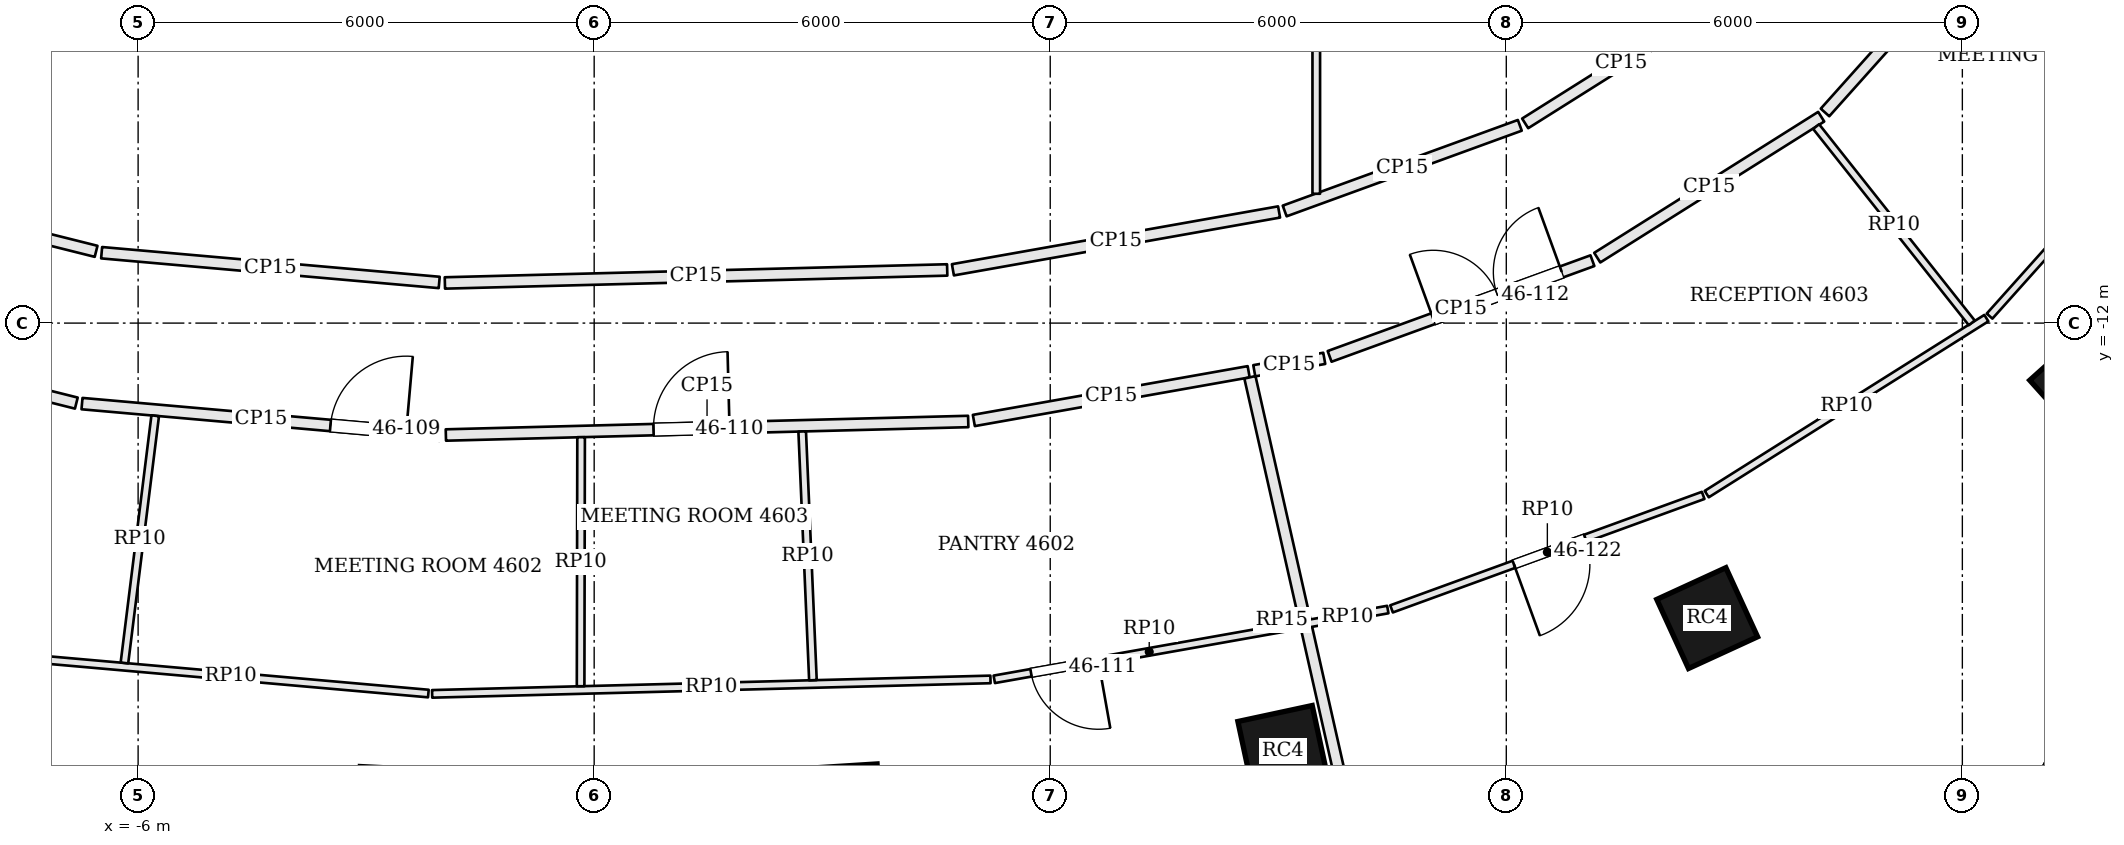
"""IFC4 building model, lengths in metres.
Left out: names, types, materials, properties, quantities, classifications, styles, units other than length and angle.
Written with IfcOpenShell. Run it as: python <this file> out.ifc"""

import sys

from ifc_helpers import new_model, si_unit, direction, frame, frame_2d, origin, origin_2d, place, context, subcontext, project, spatial, rectangle, extrude, element, fill, save


model = new_model("IFC4")
c1 = context("Model", 3, precision=1e-05, world=origin(), true_north=direction((0.0, 1.0)))
c2 = subcontext(c1, "Body", "Model", "MODEL_VIEW")
j1 = project(units=[si_unit("LENGTHUNIT", "METRE"), si_unit("PLANEANGLEUNIT", "RADIAN")], contexts=[c1])
p1 = place(None, origin())
s1 = spatial("IfcSite", under=j1, at=p1, CompositionType="ELEMENT")
p2 = place(p1, origin())
s2 = spatial("IfcBuilding", under=s1, at=p2, CompositionType="ELEMENT")
p3 = place(p2, frame((0.0, 0.0, 189.6)))
s3 = spatial("IfcBuildingStorey", under=s2, at=p3, CompositionType="ELEMENT", Elevation=189.6)
for number, where, z_axis, x_axis in (
    (1, (3.254, -18.33, 0.0), (0.0, 0.0, 1.0), (0.998, 0.063, 0.0)),
    (2, (9.063, -17.625, 0.0), (0.0, 0.0, 1.0), (0.978, 0.21, 0.0)),
    (3, (14.643, -15.881, 0.0), (0.0, 0.0, 1.0), (0.909, 0.417, 0.0)),
    (4, (19.593, -12.79, 0.0), (0.0, 0.0, 1.0), (0.744, 0.668, 0.0)),
):
    element("IfcColumn", number, at=place(p3, frame(where, z_axis=z_axis, x_axis=x_axis)), inside=s3, PredefinedType="COLUMN", context=c2, shape_type="SweptSolid", body=[
        extrude(rectangle(XDim=1.0, YDim=1.0, at=origin_2d()), origin(), (0.0, 0.0, 1.0), 3.9),
    ])
p4 = place(p3, frame((18.767, -18.854, 0.0), z_axis=(0.0, 0.0, 1.0), x_axis=(0.474475888716, 0.880268499395, 0.0)))
e5 = element("IfcWall", 5, at=p4, inside=s3, PredefinedType="SOLIDWALL", context=c2, shape_type="SweptSolid", body=[
    extrude(rectangle(XDim=4.219, YDim=0.45, at=frame_2d((2.11, 0.0))), origin(), (0.0, 0.0, 1.0), 3.7),
])
p5 = place(p4, frame((1.06, 0.0, 0.9)))
e6 = element("IfcOpeningElement", 6, at=p5, cuts=e5, PredefinedType="OPENING", context=c2, shape_type="SweptSolid", body=[
    extrude(rectangle(XDim=2.1, YDim=2.3, at=frame_2d((1.05, 1.15))), frame((0.0, 0.235, 0.0), z_axis=(0.0, -1.0, 0.0), x_axis=(1.0, 0.0, 0.0)), (0.0, 0.0, 1.0), 0.47),
])
p6 = place(p3, frame((18.896, -18.773, 3.9), z_axis=(0.0, 0.0, 1.0), x_axis=(0.474444905835, 0.880285198857, 0.0)))
e7 = element("IfcWall", 7, at=p6, inside=s3, PredefinedType="PARAPET", context=c2, shape_type="SweptSolid", body=[
    extrude(rectangle(XDim=4.05, YDim=0.3, at=frame_2d((2.025, 0.0))), origin(), (0.0, 0.0, 1.0), 1.1),
])
p7 = place(p3, frame((-11.319, -11.923, 0.0), z_axis=(0.0, 0.0, 1.0), x_axis=(0.969990815038, -0.243141561114, 0.0)))
e8 = element("IfcWall", 8, at=p7, inside=s3, PredefinedType="PARTITIONING", context=c2, shape_type="SweptSolid", body=[
    extrude(rectangle(XDim=4.645, YDim=0.15, at=frame_2d((2.323, 0.0))), origin(), (0.0, 0.0, 1.0), 3.084),
])
p8 = place(p7, frame((0.439, 0.0, 0.0)))
e9 = element("IfcOpeningElement", 9, at=p8, cuts=e8, PredefinedType="OPENING", context=c2, shape_type="SweptSolid", body=[
    extrude(rectangle(XDim=1.8, YDim=2.1, at=frame_2d((0.9, 1.05))), frame((0.0, 0.085, 0.0), z_axis=(0.0, -1.0, 0.0), x_axis=(1.0, 0.0, 0.0)), (0.0, 0.0, 1.0), 0.17),
])
p9 = place(p3, frame((-6.738, -13.059, 0.0), z_axis=(0.0, 0.0, 1.0), x_axis=(0.996143527037, -0.087738666181, 0.0)))
e10 = element("IfcWall", 10, at=p9, inside=s3, PredefinedType="PARTITIONING", context=c2, shape_type="SweptSolid", body=[
    extrude(rectangle(XDim=4.73, YDim=0.15, at=frame_2d((2.365, 0.0))), origin(), (0.0, 0.0, 1.0), 3.084),
])
p10 = place(p9, frame((3.281, 0.0, 0.0)))
e11 = element("IfcOpeningElement", 11, at=p10, cuts=e10, PredefinedType="OPENING", context=c2, shape_type="SweptSolid", body=[
    extrude(rectangle(XDim=1.0, YDim=2.4, at=frame_2d((0.5, 1.2))), frame((0.0, 0.085, 0.0), z_axis=(0.0, -1.0, 0.0), x_axis=(1.0, 0.0, 0.0)), (0.0, 0.0, 1.0), 0.17),
])
p11 = place(p3, frame((-1.951, -13.472, 0.0), z_axis=(0.0, 0.0, 1.0), x_axis=(0.999663898238, 0.025924709429, 0.0)))
e12 = element("IfcWall", 12, at=p11, inside=s3, PredefinedType="PARTITIONING", context=c2, shape_type="SweptSolid", body=[
    extrude(rectangle(XDim=6.875, YDim=0.15, at=frame_2d((3.437, 0.0))), origin(), (0.0, 0.0, 1.0), 3.084),
])
p12 = place(p11, frame((2.733, 0.0, 0.0)))
e13 = element("IfcOpeningElement", 13, at=p12, cuts=e12, PredefinedType="OPENING", context=c2, shape_type="SweptSolid", body=[
    extrude(rectangle(XDim=1.0, YDim=2.4, at=frame_2d((0.5, 1.2))), frame((0.0, 0.085, 0.0), z_axis=(0.0, -1.0, 0.0), x_axis=(1.0, 0.0, 0.0)), (0.0, 0.0, 1.0), 0.17),
])
p13 = place(p3, frame((4.995, -13.281, 0.0), z_axis=(0.0, 0.0, 1.0), x_axis=(0.984641336619, 0.174589341658, 0.0)))
e14 = element("IfcWall", 14, at=p13, inside=s3, PredefinedType="PARTITIONING", context=c2, shape_type="SweptSolid", body=[
    extrude(rectangle(XDim=3.672, YDim=0.15, at=frame_2d((1.836, 0.0))), origin(), (0.0, 0.0, 1.0), 3.084),
])
p14 = place(p3, frame((10.068, -19.093, 0.0), z_axis=(0.0, 0.0, 1.0), x_axis=(-0.22036399205, 0.975417711039, 0.0)))
e15 = element("IfcWall", 15, at=p14, inside=s3, PredefinedType="PARTITIONING", context=c2, shape_type="SweptSolid", body=[
    extrude(rectangle(XDim=6.54, YDim=0.15, at=frame_2d((3.27, 0.0))), origin(), (0.0, 0.0, 1.0), 3.184),
])
p15 = place(p3, frame((8.684, -12.627, 0.0), z_axis=(0.0, 0.0, 1.0), x_axis=(0.984625439098, 0.174678976069, 0.0)))
e16 = element("IfcWall", 16, at=p15, inside=s3, PredefinedType="PARTITIONING", context=c2, shape_type="SweptSolid", body=[
    extrude(rectangle(XDim=0.935, YDim=0.15, at=frame_2d((0.468, 0.0))), origin(), (0.0, 0.0, 1.0), 3.084),
])
p16 = place(p3, frame((9.676, -12.438, 0.0), z_axis=(0.0, 0.0, 1.0), x_axis=(0.939640289748, 0.342163887461, 0.0)))
e17 = element("IfcWall", 17, at=p16, inside=s3, PredefinedType="PARTITIONING", context=c2, shape_type="SweptSolid", body=[
    extrude(rectangle(XDim=3.68, YDim=0.15, at=frame_2d((1.84, 0.0))), origin(), (0.0, 0.0, 1.0), 3.084),
])
p17 = place(p16, frame((1.45, 0.0, 0.0)))
e18 = element("IfcOpeningElement", 18, at=p17, cuts=e17, PredefinedType="OPENING", context=c2, shape_type="SweptSolid", body=[
    extrude(rectangle(XDim=1.8, YDim=2.1, at=frame_2d((0.9, 1.05))), frame((0.0, 0.085, 0.0), z_axis=(0.0, -1.0, 0.0), x_axis=(1.0, 0.0, 0.0)), (0.0, 0.0, 1.0), 0.17),
])
p18 = place(p3, frame((13.197, -11.139, 0.0), z_axis=(0.0, 0.0, 1.0), x_axis=(0.846390903833, 0.532562144644, 0.0)))
e19 = element("IfcWall", 19, at=p18, inside=s3, PredefinedType="PARTITIONING", context=c2, shape_type="SweptSolid", body=[
    extrude(rectangle(XDim=3.481, YDim=0.15, at=frame_2d((1.741, 0.0))), origin(), (0.0, 0.0, 1.0), 3.084),
])
p19 = place(p3, frame((16.193, -9.229, 0.0), z_axis=(0.0, 0.0, 1.0), x_axis=(0.666882089048, 0.745163256815, 0.0)))
e20 = element("IfcWall", 20, at=p19, inside=s3, PredefinedType="PARTITIONING", context=c2, shape_type="SweptSolid", body=[
    extrude(rectangle(XDim=3.19, YDim=0.15, at=frame_2d((1.595, 0.0))), origin(), (0.0, 0.0, 1.0), 3.084),
])
p20 = place(p3, frame((14.777, -7.781, 0.0), z_axis=(0.0, 0.0, 1.0), x_axis=(-0.846359741043, -0.532611667862, 0.0)))
e21 = element("IfcWall", 21, at=p20, inside=s3, PredefinedType="PARTITIONING", context=c2, shape_type="SweptSolid", body=[
    extrude(rectangle(XDim=2.987, YDim=0.15, at=frame_2d((1.494, 0.0))), origin(), (0.0, 0.0, 1.0), 3.084),
])
p21 = place(p3, frame((12.178, -9.398, 0.0), z_axis=(0.0, 0.0, 1.0), x_axis=(-0.939609240084, -0.342249143093, 0.0)))
e22 = element("IfcWall", 22, at=p21, inside=s3, PredefinedType="PARTITIONING", context=c2, shape_type="SweptSolid", body=[
    extrude(rectangle(XDim=3.292, YDim=0.15, at=frame_2d((1.646, 0.0))), origin(), (0.0, 0.0, 1.0), 3.084),
])
p22 = place(p3, frame((9.01, -10.538, 0.0), z_axis=(0.0, 0.0, 1.0), x_axis=(-0.984645638575, -0.174565077936, 0.0)))
e23 = element("IfcWall", 23, at=p22, inside=s3, PredefinedType="PARTITIONING", context=c2, shape_type="SweptSolid", body=[
    extrude(rectangle(XDim=4.358, YDim=0.15, at=frame_2d((2.179, 0.0))), origin(), (0.0, 0.0, 1.0), 3.084),
])
p23 = place(p3, frame((4.645, -11.301, 0.0), z_axis=(0.0, 0.0, 1.0), x_axis=(-0.9996648469, -0.02588810291, 0.0)))
e24 = element("IfcWall", 24, at=p23, inside=s3, PredefinedType="PARTITIONING", context=c2, shape_type="SweptSolid", body=[
    extrude(rectangle(XDim=6.611, YDim=0.15, at=frame_2d((3.305, 0.0))), origin(), (0.0, 0.0, 1.0), 3.084),
])
p24 = place(p3, frame((-2.039, -11.465, 0.0), z_axis=(0.0, 0.0, 1.0), x_axis=(-0.996139855484, 0.087780341286, 0.0)))
e25 = element("IfcWall", 25, at=p24, inside=s3, PredefinedType="PARTITIONING", context=c2, shape_type="SweptSolid", body=[
    extrude(rectangle(XDim=4.458, YDim=0.15, at=frame_2d((2.229, 0.0))), origin(), (0.0, 0.0, 1.0), 3.084),
])
p25 = place(p3, frame((-6.553, -11.056, 0.0), z_axis=(0.0, 0.0, 1.0), x_axis=(-0.970004917182, 0.243085294995, 0.0)))
e26 = element("IfcWall", 26, at=p25, inside=s3, PredefinedType="PARTITIONING", context=c2, shape_type="SweptSolid", body=[
    extrude(rectangle(XDim=4.284, YDim=0.15, at=frame_2d((2.142, 0.0))), origin(), (0.0, 0.0, 1.0), 3.084),
])
p26 = place(p3, frame((9.341, -15.964, 0.0), z_axis=(0.0, 0.0, 1.0), x_axis=(-0.984642561651, -0.174582432638, 0.0)))
e27 = element("IfcWall", 27, at=p26, inside=s3, PredefinedType="PARTITIONING", context=c2, shape_type="SweptSolid", body=[
    extrude(rectangle(XDim=4.141, YDim=0.1, at=frame_2d((2.07, 0.0))), origin(), (0.0, 0.0, 1.0), 3.084),
])
p27 = place(p26, frame((2.75, 0.0, 0.0)))
e28 = element("IfcOpeningElement", 28, at=p27, cuts=e27, PredefinedType="OPENING", context=c2, shape_type="SweptSolid", body=[
    extrude(rectangle(XDim=0.9, YDim=2.1, at=frame_2d((0.45, 1.05))), frame((0.0, 0.06, 0.0), z_axis=(0.0, -1.0, 0.0), x_axis=(1.0, 0.0, 0.0)), (0.0, 0.0, 1.0), 0.12),
])
p28 = place(p3, frame((5.214, -16.688, 0.0), z_axis=(0.0, 0.0, 1.0), x_axis=(-0.999664981446, -0.025882906921, 0.0)))
e29 = element("IfcWall", 29, at=p28, inside=s3, PredefinedType="PARTITIONING", context=c2, shape_type="SweptSolid", body=[
    extrude(rectangle(XDim=7.348, YDim=0.1, at=frame_2d((3.674, 0.0))), origin(), (0.0, 0.0, 1.0), 3.084),
])
p29 = place(p3, frame((-2.181, -16.874, 0.0), z_axis=(0.0, 0.0, 1.0), x_axis=(-0.996143934904, 0.087734035321, 0.0)))
e30 = element("IfcWall", 30, at=p29, inside=s3, PredefinedType="PARTITIONING", context=c2, shape_type="SweptSolid", body=[
    extrude(rectangle(XDim=5.218, YDim=0.1, at=frame_2d((2.609, 0.0))), origin(), (0.0, 0.0, 1.0), 3.084),
])
p30 = place(p3, frame((-5.775, -13.219, 0.0), z_axis=(0.0, 0.0, 1.0), x_axis=(-0.123512108853, -0.992343065158, 0.0)))
e31 = element("IfcWall", 31, at=p30, inside=s3, PredefinedType="PARTITIONING", context=c2, shape_type="SweptSolid", body=[
    extrude(rectangle(XDim=3.277, YDim=0.1, at=frame_2d((1.639, 0.0))), origin(), (0.0, 0.0, 1.0), 3.084),
])
p31 = place(p3, frame((-0.172, -13.501, 0.0), z_axis=(0.0, 0.0, 1.0), x_axis=(-0.001937403219, -0.999998123233, 0.0)))
e32 = element("IfcWall", 32, at=p31, inside=s3, PredefinedType="PARTITIONING", context=c2, shape_type="SweptSolid", body=[
    extrude(rectangle(XDim=3.276, YDim=0.1, at=frame_2d((1.638, 0.0))), origin(), (0.0, 0.0, 1.0), 3.084),
])
p32 = place(p3, frame((2.737, -13.426, 0.0), z_axis=(0.0, 0.0, 1.0), x_axis=(0.043081420795, -0.999071564595, 0.0)))
e33 = element("IfcWall", 33, at=p32, inside=s3, PredefinedType="PARTITIONING", context=c2, shape_type="SweptSolid", body=[
    extrude(rectangle(XDim=3.275, YDim=0.1, at=frame_2d((1.638, 0.0))), origin(), (0.0, 0.0, 1.0), 3.084),
])
p33 = place(p3, frame((21.149, -8.789, 0.0), z_axis=(0.0, 0.0, 1.0), x_axis=(-0.666915902537, -0.745132994132, 0.0)))
e34 = element("IfcWall", 34, at=p33, inside=s3, PredefinedType="PARTITIONING", context=c2, shape_type="SweptSolid", body=[
    extrude(rectangle(XDim=4.186, YDim=0.1, at=frame_2d((2.093, 0.0))), origin(), (0.0, 0.0, 1.0), 3.084),
])
p34 = place(p3, frame((18.316, -11.935, 0.0), z_axis=(0.0, 0.0, 1.0), x_axis=(-0.84637539713, -0.532586788358, 0.0)))
e35 = element("IfcWall", 35, at=p34, inside=s3, PredefinedType="PARTITIONING", context=c2, shape_type="SweptSolid", body=[
    extrude(rectangle(XDim=4.346, YDim=0.1, at=frame_2d((2.173, 0.0))), origin(), (0.0, 0.0, 1.0), 3.084),
])
p35 = place(p3, frame((14.59, -14.267, 0.0), z_axis=(0.0, 0.0, 1.0), x_axis=(-0.939623405418, -0.342210251148, 0.0)))
e36 = element("IfcWall", 36, at=p35, inside=s3, PredefinedType="PARTITIONING", context=c2, shape_type="SweptSolid", body=[
    extrude(rectangle(XDim=4.363, YDim=0.1, at=frame_2d((2.182, 0.0))), origin(), (0.0, 0.0, 1.0), 3.084),
])
p36 = place(p35, frame((1.65, 0.0, 0.0)))
e37 = element("IfcOpeningElement", 37, at=p36, cuts=e36, PredefinedType="OPENING", context=c2, shape_type="SweptSolid", body=[
    extrude(rectangle(XDim=1.0, YDim=2.1, at=frame_2d((0.5, 1.05))), frame((0.0, 0.06, 0.0), z_axis=(0.0, -1.0, 0.0), x_axis=(1.0, 0.0, 0.0)), (0.0, 0.0, 1.0), 0.12),
])
p37 = place(p3, frame((10.441, -15.769, 0.0), z_axis=(0.0, 0.0, 1.0), x_axis=(-0.984657825384, -0.174496323486, 0.0)))
e38 = element("IfcWall", 38, at=p37, inside=s3, PredefinedType="PARTITIONING", context=c2, shape_type="SweptSolid", body=[
    extrude(rectangle(XDim=1.077, YDim=0.1, at=frame_2d((0.539, 0.0))), origin(), (0.0, 0.0, 1.0), 3.084),
])
p38 = place(p3, frame((16.076, -9.415, 0.0), z_axis=(0.0, 0.0, 1.0), x_axis=(0.621346089483, -0.783536238526, 0.0)))
e39 = element("IfcWall", 39, at=p38, inside=s3, PredefinedType="PARTITIONING", context=c2, shape_type="SweptSolid", body=[
    extrude(rectangle(XDim=3.295, YDim=0.1, at=frame_2d((1.647, 0.0))), origin(), (0.0, 0.0, 1.0), 3.084),
])
p39 = place(p3, frame((9.5, -10.299, 0.0), z_axis=(0.0, 0.0, 1.0), x_axis=(0.0, 1.0, 0.0)))
e40 = element("IfcWall", 40, at=p39, inside=s3, PredefinedType="PARTITIONING", context=c2, shape_type="SweptSolid", body=[
    extrude(rectangle(XDim=5.224, YDim=0.1, at=frame_2d((2.612, 0.0))), origin(), (0.0, 0.0, 1.0), 3.084),
])
p40 = place(p10, origin())
e41 = element("IfcDoor", 41, at=p40, inside=s3, OperationType="SINGLE_SWING_RIGHT", PredefinedType="DOOR", context=c2, shape_type="SweptSolid", body=[
    extrude(rectangle(XDim=1.0, YDim=2.4, at=frame_2d((0.5, 1.2))), frame((0.0, 0.025, 0.0), z_axis=(0.0, -1.0, 0.0), x_axis=(1.0, 0.0, 0.0)), (0.0, 0.0, 1.0), 0.05),
])
fill(e11, e41)
p41 = place(p12, origin())
e42 = element("IfcDoor", 42, at=p41, inside=s3, OperationType="SINGLE_SWING_RIGHT", PredefinedType="DOOR", context=c2, shape_type="SweptSolid", body=[
    extrude(rectangle(XDim=1.0, YDim=2.4, at=frame_2d((0.5, 1.2))), frame((0.0, 0.025, 0.0), z_axis=(0.0, -1.0, 0.0), x_axis=(1.0, 0.0, 0.0)), (0.0, 0.0, 1.0), 0.05),
])
fill(e13, e42)
p42 = place(p27, origin())
e43 = element("IfcDoor", 43, at=p42, inside=s3, OperationType="SINGLE_SWING_LEFT", PredefinedType="DOOR", context=c2, shape_type="SweptSolid", body=[
    extrude(rectangle(XDim=0.9, YDim=2.1, at=frame_2d((0.45, 1.05))), frame((0.0, 0.025, 0.0), z_axis=(0.0, -1.0, 0.0), x_axis=(1.0, 0.0, 0.0)), (0.0, 0.0, 1.0), 0.05),
])
fill(e28, e43)
p43 = place(p17, origin())
e44 = element("IfcDoor", 44, at=p43, inside=s3, OperationType="DOUBLE_DOOR_SINGLE_SWING", PredefinedType="DOOR", context=c2, shape_type="SweptSolid", body=[
    extrude(rectangle(XDim=1.8, YDim=2.1, at=frame_2d((0.9, 1.05))), frame((0.0, 0.025, 0.0), z_axis=(0.0, -1.0, 0.0), x_axis=(1.0, 0.0, 0.0)), (0.0, 0.0, 1.0), 0.05),
])
fill(e18, e44)
p44 = place(p36, origin())
e45 = element("IfcDoor", 45, at=p44, inside=s3, OperationType="SINGLE_SWING_RIGHT", PredefinedType="DOOR", context=c2, shape_type="SweptSolid", body=[
    extrude(rectangle(XDim=1.0, YDim=2.1, at=frame_2d((0.5, 1.05))), frame((0.0, 0.025, 0.0), z_axis=(0.0, -1.0, 0.0), x_axis=(1.0, 0.0, 0.0)), (0.0, 0.0, 1.0), 0.05),
])
fill(e37, e45)
save(model, sys.argv[1])
